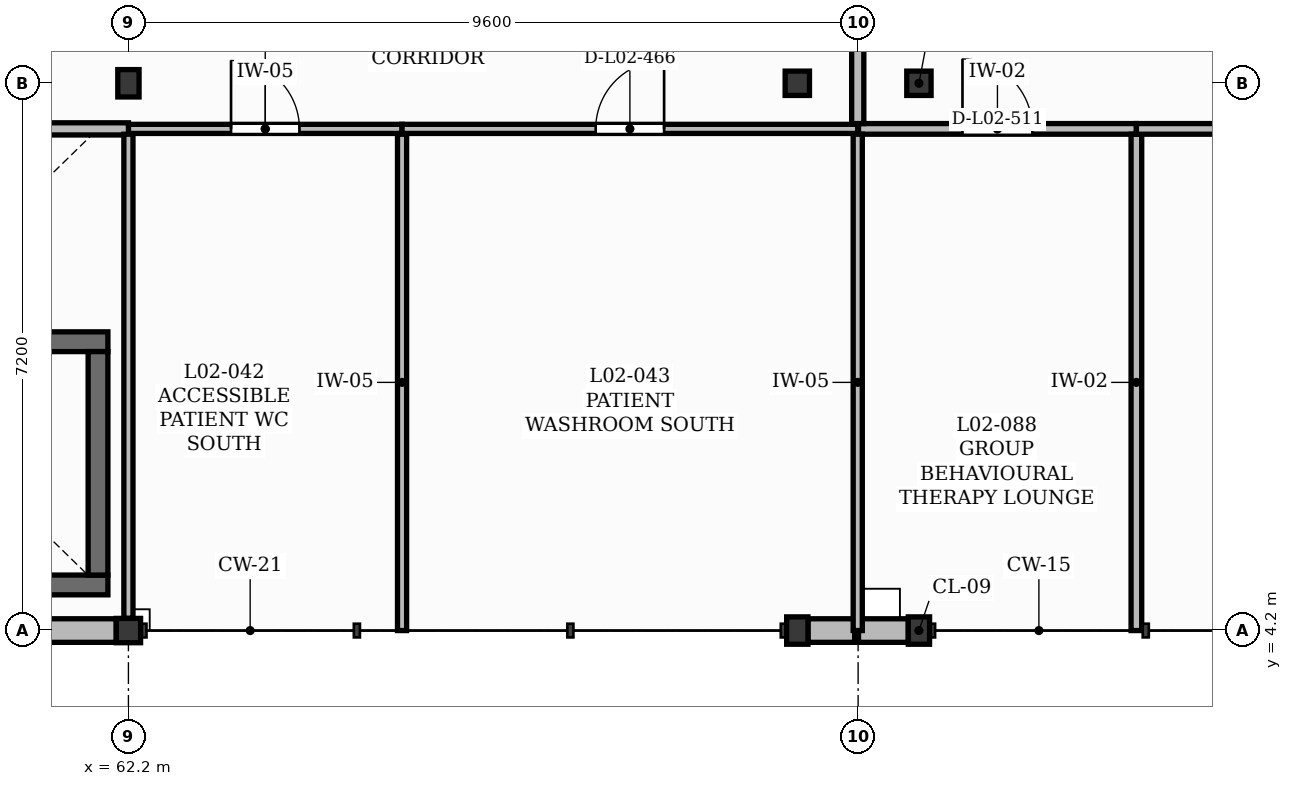
"""IFC4 building model, lengths in metres.
Left out: names, types, materials, properties, quantities, classifications, styles, units other than length and angle.
Written with IfcOpenShell. Run it as: python <this file> out.ifc"""

import sys

from ifc_helpers import new_model, si_unit, direction, frame, frame_2d, origin, origin_2d, place, context, subcontext, project, spatial, rectangle, extrude, element, fill, save


model = new_model("IFC4")
c1 = context("Model", 3, precision=1e-05, world=origin(), true_north=direction((0.0, 1.0)))
c2 = subcontext(c1, "Body", "Model", "MODEL_VIEW")
j1 = project(units=[si_unit("LENGTHUNIT", "METRE"), si_unit("PLANEANGLEUNIT", "RADIAN")], contexts=[c1])
p1 = place(None, origin())
s1 = spatial("IfcSite", under=j1, at=p1, CompositionType="ELEMENT")
p2 = place(p1, origin())
s2 = spatial("IfcBuilding", under=s1, at=p2, CompositionType="ELEMENT")
p3 = place(p2, frame((0.0, 0.0, 9.0)))
s3 = spatial("IfcBuildingStorey", under=s2, at=p3, CompositionType="ELEMENT", Elevation=9.0)
p4 = place(p3, frame((72.6, 4.2, 0.0), z_axis=(0.0, 0.0, 1.0), x_axis=(1.0, 0.0, 0.0)))
e1 = element("IfcColumn", 1, at=p4, inside=s3, PredefinedType="COLUMN", context=c2, shape_type="SweptSolid", body=[
    extrude(rectangle(XDim=0.28, YDim=0.36, at=origin_2d()), origin(), (0.0, 0.0, 1.0), 3.99),
])
for number, where, z_axis, x_axis in (
    (2, (72.6, 11.4, 0.0), (0.0, 0.0, 1.0), (1.0, 0.0, 0.0)),
    (3, (62.2, 4.2, 0.0), (0.0, 0.0, 1.0), (1.0, 0.0, 0.0)),
):
    element("IfcColumn", number, at=place(p3, frame(where, z_axis=z_axis, x_axis=x_axis)), inside=s3, PredefinedType="COLUMN", context=c2, shape_type="SweptSolid", body=[
        extrude(rectangle(XDim=0.32, YDim=0.32, at=origin_2d()), origin(), (0.0, 0.0, 1.0), 3.99),
    ])
for number, where, z_axis, x_axis in (
    (4, (62.2, 11.4, 0.0), (0.0, 0.0, 1.0), (1.0, 0.0, 0.0)),
    (5, (71.0, 4.2, 0.0), (0.0, 0.0, 1.0), (1.0, 0.0, 0.0)),
):
    element("IfcColumn", number, at=place(p3, frame(where, z_axis=z_axis, x_axis=x_axis)), inside=s3, PredefinedType="COLUMN", context=c2, shape_type="SweptSolid", body=[
        extrude(rectangle(XDim=0.28, YDim=0.36, at=origin_2d()), origin(), (0.0, 0.0, 1.0), 3.99),
    ])
p5 = place(p3, frame((71.0, 11.4, 0.0), z_axis=(0.0, 0.0, 1.0), x_axis=(1.0, 0.0, 0.0)))
e6 = element("IfcColumn", 6, at=p5, inside=s3, PredefinedType="COLUMN", context=c2, shape_type="SweptSolid", body=[
    extrude(rectangle(XDim=0.32, YDim=0.32, at=origin_2d()), origin(), (0.0, 0.0, 1.0), 3.99),
])
p6 = place(p3, frame((58.72, 4.2, 0.0), z_axis=(0.0, 0.0, 1.0), x_axis=(1.0, 0.0, 0.0)))
e7 = element("IfcWall", 7, at=p6, inside=s3, PredefinedType="SOLIDWALL", context=c2, shape_type="SweptSolid", body=[
    extrude(rectangle(XDim=3.32, YDim=0.31, at=frame_2d((1.66, 0.0))), origin(), (0.0, 0.0, 1.0), 3.53),
])
p7 = place(p3, frame((71.14, 4.2, 0.0), z_axis=(0.0, 0.0, 1.0), x_axis=(1.0, 0.0, 0.0)))
e8 = element("IfcWall", 8, at=p7, inside=s3, PredefinedType="SOLIDWALL", context=c2, shape_type="SweptSolid", body=[
    extrude(rectangle(XDim=0.615, YDim=0.31, at=frame_2d((0.308, 0.0))), origin(), (0.0, 0.0, 1.0), 3.99),
])
p8 = place(p3, frame((71.805, 4.2, 0.0), z_axis=(0.0, 0.0, 1.0), x_axis=(1.0, 0.0, 0.0)))
e9 = element("IfcWall", 9, at=p8, inside=s3, PredefinedType="SOLIDWALL", context=c2, shape_type="SweptSolid", body=[
    extrude(rectangle(XDim=0.655, YDim=0.31, at=frame_2d((0.328, 0.0))), origin(), (0.0, 0.0, 1.0), 3.99),
])
for number, where, z_axis, x_axis in (
    (10, (55.27, 4.8, 0.0), (0.0, 0.0, 1.0), (1.0, 0.0, 0.0)),
    (11, (55.27, 8.0, 0.0), (0.0, 0.0, 1.0), (1.0, 0.0, 0.0)),
):
    element("IfcWall", number, at=place(p3, frame(where, z_axis=z_axis, x_axis=x_axis)), inside=s3, PredefinedType="SHEAR", context=c2, shape_type="SweptSolid", body=[
        extrude(rectangle(XDim=6.66, YDim=0.26, at=frame_2d((3.33, 0.0))), origin(), (0.0, 0.0, 1.0), 3.95),
    ])
p9 = place(p3, frame((61.8, 4.93, 0.0), z_axis=(0.0, 0.0, 1.0), x_axis=(0.0, 1.0, 0.0)))
e12 = element("IfcWall", 12, at=p9, inside=s3, PredefinedType="SHEAR", context=c2, shape_type="SweptSolid", body=[
    extrude(rectangle(XDim=2.94, YDim=0.26, at=frame_2d((1.47, 0.0))), origin(), (0.0, 0.0, 1.0), 3.95),
])
p10 = place(p3, frame((62.2, 10.8, 0.0), z_axis=(0.0, 0.0, 1.0), x_axis=(1.0, 0.0, 0.0)))
e13 = element("IfcWall", 13, at=p10, inside=s3, PredefinedType="PLUMBINGWALL", context=c2, shape_type="SweptSolid", body=[
    extrude(rectangle(XDim=3.6, YDim=0.12, at=frame_2d((1.8, 0.0))), origin(), (0.0, 0.0, 1.0), 3.96),
])
p11 = place(p10, frame((1.35, 0.0, 0.0)))
e14 = element("IfcOpeningElement", 14, at=p11, cuts=e13, PredefinedType="OPENING", context=c2, shape_type="SweptSolid", body=[
    extrude(rectangle(XDim=0.9, YDim=2.1, at=frame_2d((0.45, 1.05))), frame((0.0, 0.07, 0.0), z_axis=(0.0, -1.0, 0.0), x_axis=(1.0, 0.0, 0.0)), (0.0, 0.0, 1.0), 0.14),
])
p12 = place(p3, frame((65.8, 4.2, 0.0), z_axis=(0.0, 0.0, 1.0), x_axis=(0.0, 1.0, 0.0)))
e15 = element("IfcWall", 15, at=p12, inside=s3, PredefinedType="PLUMBINGWALL", context=c2, shape_type="SweptSolid", body=[
    extrude(rectangle(XDim=6.53, YDim=0.12, at=frame_2d((3.265, 0.0))), origin(), (0.0, 0.0, 1.0), 3.96),
])
p13 = place(p3, frame((65.8, 10.8, 0.0), z_axis=(0.0, 0.0, 1.0), x_axis=(1.0, 0.0, 0.0)))
e16 = element("IfcWall", 16, at=p13, inside=s3, PredefinedType="PLUMBINGWALL", context=c2, shape_type="SweptSolid", body=[
    extrude(rectangle(XDim=5.995, YDim=0.12, at=frame_2d((2.998, 0.0))), origin(), (0.0, 0.0, 1.0), 3.96),
])
p14 = place(p13, frame((2.548, 0.0, 0.0)))
e17 = element("IfcOpeningElement", 17, at=p14, cuts=e16, PredefinedType="OPENING", context=c2, shape_type="SweptSolid", body=[
    extrude(rectangle(XDim=0.9, YDim=2.1, at=frame_2d((0.45, 1.05))), frame((0.0, 0.07, 0.0), z_axis=(0.0, -1.0, 0.0), x_axis=(1.0, 0.0, 0.0)), (0.0, 0.0, 1.0), 0.14),
])
p15 = place(p3, frame((71.805, 10.8, 0.0), z_axis=(0.0, 0.0, 1.0), x_axis=(1.0, 0.0, 0.0)))
e18 = element("IfcWall", 18, at=p15, inside=s3, PredefinedType="PARTITIONING", context=c2, shape_type="SweptSolid", body=[
    extrude(rectangle(XDim=3.656, YDim=0.14, at=frame_2d((1.828, 0.0))), origin(), (0.0, 0.0, 1.0), 3.96),
])
p16 = place(p15, frame((1.368, 0.0, 0.0)))
e19 = element("IfcOpeningElement", 19, at=p16, cuts=e18, PredefinedType="OPENING", context=c2, shape_type="SweptSolid", body=[
    extrude(rectangle(XDim=0.92, YDim=2.1, at=frame_2d((0.46, 1.05))), frame((0.0, 0.08, 0.0), z_axis=(0.0, -1.0, 0.0), x_axis=(1.0, 0.0, 0.0)), (0.0, 0.0, 1.0), 0.16),
])
p17 = place(p3, frame((75.461, 4.2, 0.0), z_axis=(0.0, 0.0, 1.0), x_axis=(0.0, 1.0, 0.0)))
e20 = element("IfcWall", 20, at=p17, inside=s3, PredefinedType="PARTITIONING", context=c2, shape_type="SweptSolid", body=[
    extrude(rectangle(XDim=6.53, YDim=0.14, at=frame_2d((3.265, 0.0))), origin(), (0.0, 0.0, 1.0), 3.96),
])
p18 = place(p3, frame((75.461, 10.8, 0.0), z_axis=(0.0, 0.0, 1.0), x_axis=(1.0, 0.0, 0.0)))
e21 = element("IfcWall", 21, at=p18, inside=s3, PredefinedType="PARTITIONING", context=c2, shape_type="SweptSolid", body=[
    extrude(rectangle(XDim=5.939, YDim=0.14, at=frame_2d((2.969, 0.0))), origin(), (0.0, 0.0, 1.0), 3.96),
])
p19 = place(p18, frame((2.389, 0.0, 0.0)))
e22 = element("IfcOpeningElement", 22, at=p19, cuts=e21, PredefinedType="OPENING", context=c2, shape_type="SweptSolid", body=[
    extrude(rectangle(XDim=1.16, YDim=2.1, at=frame_2d((0.58, 1.05))), frame((0.0, 0.08, 0.0), z_axis=(0.0, -1.0, 0.0), x_axis=(1.0, 0.0, 0.0)), (0.0, 0.0, 1.0), 0.16),
])
p20 = place(p3, frame((59.4, 10.8, 0.0), z_axis=(0.0, 0.0, 1.0), x_axis=(1.0, 0.0, 0.0)))
e23 = element("IfcWall", 23, at=p20, inside=s3, PredefinedType="PARTITIONING", context=c2, shape_type="SweptSolid", body=[
    extrude(rectangle(XDim=2.8, YDim=0.16, at=frame_2d((1.4, 0.0))), origin(), (0.0, 0.0, 1.0), 3.96),
])
p21 = place(p3, frame((71.795, 10.87, 0.0), z_axis=(0.0, 0.0, 1.0), x_axis=(0.0, 1.0, 0.0)))
e24 = element("IfcWall", 24, at=p21, inside=s3, PredefinedType="PARTITIONING", context=c2, shape_type="SweptSolid", body=[
    extrude(rectangle(XDim=2.46, YDim=0.16, at=frame_2d((1.23, 0.0))), origin(), (0.0, 0.0, 1.0), 3.96),
])
p22 = place(p3, frame((62.2, 4.36, 0.0), z_axis=(0.0, 0.0, 1.0), x_axis=(0.0, 1.0, 0.0)))
e25 = element("IfcWall", 25, at=p22, inside=s3, PredefinedType="PLUMBINGWALL", context=c2, shape_type="SweptSolid", body=[
    extrude(rectangle(XDim=6.37, YDim=0.12, at=frame_2d((3.185, 0.0))), origin(), (0.0, 0.0, 1.0), 3.47),
])
p23 = place(p3, frame((71.795, 4.2, 0.0), z_axis=(0.0, 0.0, 1.0), x_axis=(0.0, 1.0, 0.0)))
e26 = element("IfcWall", 26, at=p23, inside=s3, PredefinedType="PLUMBINGWALL", context=c2, shape_type="SweptSolid", body=[
    extrude(rectangle(XDim=6.53, YDim=0.12, at=frame_2d((3.265, 0.0))), origin(), (0.0, 0.0, 1.0), 3.96),
])
p24 = place(p11, origin())
e27 = element("IfcDoor", 27, at=p24, inside=s3, OperationType="SINGLE_SWING_LEFT", PredefinedType="DOOR", context=c2, shape_type="SweptSolid", body=[
    extrude(rectangle(XDim=0.9, YDim=2.1, at=frame_2d((0.45, 1.05))), frame((0.0, 0.025, 0.0), z_axis=(0.0, -1.0, 0.0), x_axis=(1.0, 0.0, 0.0)), (0.0, 0.0, 1.0), 0.05),
])
fill(e14, e27)
p25 = place(p14, origin())
e28 = element("IfcDoor", 28, at=p25, inside=s3, OperationType="SINGLE_SWING_RIGHT", PredefinedType="DOOR", context=c2, shape_type="SweptSolid", body=[
    extrude(rectangle(XDim=0.9, YDim=2.1, at=frame_2d((0.45, 1.05))), frame((0.0, 0.025, 0.0), z_axis=(0.0, -1.0, 0.0), x_axis=(1.0, 0.0, 0.0)), (0.0, 0.0, 1.0), 0.05),
])
fill(e17, e28)
p26 = place(p16, origin())
e29 = element("IfcDoor", 29, at=p26, inside=s3, OperationType="SINGLE_SWING_LEFT", PredefinedType="DOOR", context=c2, shape_type="SweptSolid", body=[
    extrude(rectangle(XDim=0.92, YDim=2.1, at=frame_2d((0.46, 1.05))), frame((0.0, 0.025, 0.0), z_axis=(0.0, -1.0, 0.0), x_axis=(1.0, 0.0, 0.0)), (0.0, 0.0, 1.0), 0.05),
])
fill(e19, e29)
save(model, sys.argv[1])
